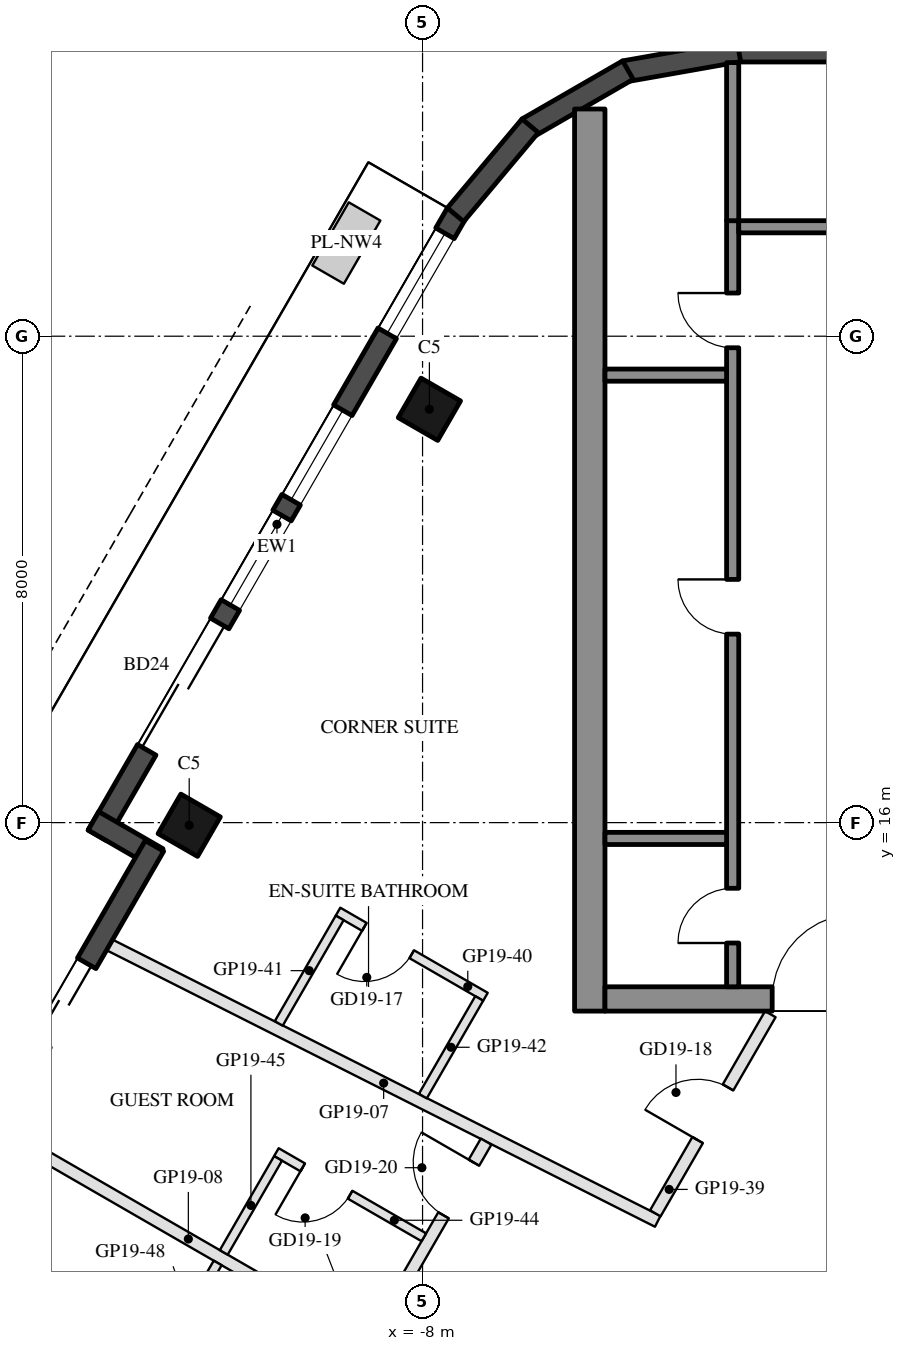
"""IFC4 building model, lengths in metres.
Left out: names, types, materials, properties, quantities, classifications, styles, units other than length and angle.
Written with IfcOpenShell. Run it as: python <this file> out.ifc"""

import sys

from ifc_helpers import new_model, si_unit, direction, frame, frame_2d, origin, origin_2d, place, context, subcontext, project, spatial, rectangle, hollow_rectangle, extrude, element, fill, save


model = new_model("IFC4")
c1 = context("Model", 3, precision=1e-05, world=origin(), true_north=direction((0.0, 1.0)))
c2 = subcontext(c1, "Body", "Model", "MODEL_VIEW")
j1 = project(units=[si_unit("LENGTHUNIT", "METRE"), si_unit("PLANEANGLEUNIT", "RADIAN")], contexts=[c1])
p1 = place(None, origin())
s1 = spatial("IfcSite", under=j1, at=p1, CompositionType="ELEMENT")
p2 = place(p1, origin())
s2 = spatial("IfcBuilding", under=s1, at=p2, CompositionType="ELEMENT")
p3 = place(p2, frame((0.0, 0.0, 205.8)))
s3 = spatial("IfcBuildingStorey", under=s2, at=p3, CompositionType="ELEMENT", Elevation=205.8)
for number, where, z_axis, x_axis in (
    (1, (-7.888, 22.798, 0.0), (0.0, 0.0, 1.0), (0.5, 0.866, 0.0)),
    (2, (-11.838, 15.957, 0.0), (0.0, 0.0, 1.0), (0.5, 0.866, 0.0)),
):
    element("IfcColumn", number, at=place(p3, frame(where, z_axis=z_axis, x_axis=x_axis)), inside=s3, PredefinedType="COLUMN", context=c2, shape_type="SweptSolid", body=[
        extrude(hollow_rectangle(XDim=0.75, YDim=0.75, WallThickness=0.035, at=origin_2d()), origin(), (0.0, 0.0, 1.0), 3.7),
    ])
p4 = place(p3, frame((-7.441, 26.022, 0.0), z_axis=(0.0, 0.0, 1.0), x_axis=(-0.499992533062, -0.86602971478, 0.0)))
e3 = element("IfcWall", 3, at=p4, inside=s3, PredefinedType="SOLIDWALL", context=c2, shape_type="SweptSolid", body=[
    extrude(rectangle(XDim=11.816, YDim=0.35, at=frame_2d((5.908, 0.0))), origin(), (0.0, 0.0, 1.0), 3.55),
])
p5 = place(p4, frame((0.381, 0.0, 0.3)))
e4 = element("IfcOpeningElement", 4, at=p5, cuts=e3, PredefinedType="OPENING", context=c2, shape_type="SweptSolid", body=[
    extrude(rectangle(XDim=1.9, YDim=2.65, at=frame_2d((0.95, 1.325))), frame((0.0, 0.185, 0.0), z_axis=(0.0, -1.0, 0.0), x_axis=(1.0, 0.0, 0.0)), (0.0, 0.0, 1.0), 0.37),
])
p6 = place(p4, frame((7.791, 0.0, 0.0)))
e5 = element("IfcOpeningElement", 5, at=p6, cuts=e3, PredefinedType="OPENING", context=c2, shape_type="SweptSolid", body=[
    extrude(rectangle(XDim=2.4, YDim=2.4, at=frame_2d((1.2, 1.2))), frame((0.0, 0.185, 0.0), z_axis=(0.0, -1.0, 0.0), x_axis=(1.0, 0.0, 0.0)), (0.0, 0.0, 1.0), 0.37),
])
p7 = place(p4, frame((3.741, 0.0, 0.3)))
e6 = element("IfcOpeningElement", 6, at=p7, cuts=e3, PredefinedType="OPENING", context=c2, shape_type="SweptSolid", body=[
    extrude(rectangle(XDim=1.7, YDim=2.65, at=frame_2d((0.85, 1.325))), frame((0.0, 0.185, 0.0), z_axis=(0.0, -1.0, 0.0), x_axis=(1.0, 0.0, 0.0)), (0.0, 0.0, 1.0), 0.37),
])
p8 = place(p4, frame((5.741, 0.0, 0.3)))
e7 = element("IfcOpeningElement", 7, at=p8, cuts=e3, PredefinedType="OPENING", context=c2, shape_type="SweptSolid", body=[
    extrude(rectangle(XDim=1.7, YDim=2.65, at=frame_2d((0.85, 1.325))), frame((0.0, 0.185, 0.0), z_axis=(0.0, -1.0, 0.0), x_axis=(1.0, 0.0, 0.0)), (0.0, 0.0, 1.0), 0.37),
])
p9 = place(p3, frame((-13.413, 16.029, 0.0), z_axis=(0.0, 0.0, 1.0), x_axis=(0.866005645448, -0.500034220881, 0.0)))
e8 = element("IfcWall", 8, at=p9, inside=s3, PredefinedType="SOLIDWALL", context=c2, shape_type="SweptSolid", body=[
    extrude(rectangle(XDim=1.22, YDim=0.35, at=frame_2d((0.61, 0.0))), origin(), (0.0, 0.0, 1.0), 3.55),
])
p10 = place(p3, frame((-12.409, 15.617, 0.0), z_axis=(0.0, 0.0, 1.0), x_axis=(-0.500003597184, -0.866023326939, 0.0)))
e9 = element("IfcWall", 9, at=p10, inside=s3, PredefinedType="SOLIDWALL", context=c2, shape_type="SweptSolid", body=[
    extrude(rectangle(XDim=6.74, YDim=0.35, at=frame_2d((3.37, 0.0))), origin(), (0.0, 0.0, 1.0), 3.55),
])
p11 = place(p10, frame((2.229, 0.0, 0.0)))
e10 = element("IfcOpeningElement", 10, at=p11, cuts=e9, PredefinedType="OPENING", context=c2, shape_type="SweptSolid", body=[
    extrude(rectangle(XDim=1.5, YDim=2.4, at=frame_2d((0.75, 1.2))), frame((0.0, 0.185, 0.0), z_axis=(0.0, -1.0, 0.0), x_axis=(1.0, 0.0, 0.0)), (0.0, 0.0, 1.0), 0.37),
])
p12 = place(p10, frame((4.029, 0.0, 0.3)))
e11 = element("IfcOpeningElement", 11, at=p12, cuts=e9, PredefinedType="OPENING", context=c2, shape_type="SweptSolid", body=[
    extrude(rectangle(XDim=0.8, YDim=2.65, at=frame_2d((0.4, 1.325))), frame((0.0, 0.185, 0.0), z_axis=(0.0, -1.0, 0.0), x_axis=(1.0, 0.0, 0.0)), (0.0, 0.0, 1.0), 0.37),
])
p13 = place(p3, frame((2.829, 28.685, 0.0), z_axis=(0.0, 0.0, 1.0), x_axis=(-1.0, 0.0, 0.0)))
e12 = element("IfcWall", 12, at=p13, inside=s3, PredefinedType="SOLIDWALL", context=c2, shape_type="SweptSolid", body=[
    extrude(rectangle(XDim=5.658, YDim=0.35, at=frame_2d((2.829, 0.0))), origin(), (0.0, 0.0, 1.0), 3.55),
])
for number, where, z_axis, x_axis in (
    (13, (-2.799, 28.688, 0.0), (0.0, 0.0, 1.0), (-0.985, -0.174, 0.0)),
    (14, (-4.623, 28.377, 0.0), (0.0, 0.0, 1.0), (-0.866, -0.5, 0.0)),
):
    element("IfcWall", number, at=place(p3, frame(where, z_axis=z_axis, x_axis=x_axis)), inside=s3, PredefinedType="SOLIDWALL", context=c2, shape_type="SweptSolid", body=[
        extrude(rectangle(XDim=1.91, YDim=0.35, at=frame_2d((0.955, 0.0))), origin(), (0.0, 0.0, 1.0), 3.55),
    ])
p14 = place(p3, frame((-6.23, 27.461, 0.0), z_axis=(0.0, 0.0, 1.0), x_axis=(-0.642808304945, -0.766027077259, 0.0)))
e15 = element("IfcWall", 15, at=p14, inside=s3, PredefinedType="SOLIDWALL", context=c2, shape_type="SweptSolid", body=[
    extrude(rectangle(XDim=1.91, YDim=0.35, at=frame_2d((0.955, 0.0))), origin(), (0.0, 0.0, 1.0), 3.55),
])
p15 = place(p3, frame((-5.25, 12.9, 0.0), z_axis=(0.0, 0.0, 1.0), x_axis=(0.0, 1.0, 0.0)))
e16 = element("IfcWall", 16, at=p15, inside=s3, PredefinedType="SHEAR", context=c2, shape_type="SweptSolid", body=[
    extrude(rectangle(XDim=14.837, YDim=0.5, at=frame_2d((7.418, 0.0))), origin(), (0.0, 0.0, 1.0), 3.5),
])
p16 = place(p3, frame((5.0, 13.1, 0.0), z_axis=(0.0, 0.0, 1.0), x_axis=(-1.0, 0.0, 0.0)))
e17 = element("IfcWall", 17, at=p16, inside=s3, PredefinedType="SHEAR", context=c2, shape_type="SweptSolid", body=[
    extrude(rectangle(XDim=10.0, YDim=0.4, at=frame_2d((5.0, 0.0))), origin(), (0.0, 0.0, 1.0), 3.5),
])
p17 = place(p16, frame((3.55, 0.0, 0.0)))
e18 = element("IfcOpeningElement", 18, at=p17, cuts=e17, PredefinedType="OPENING", context=c2, shape_type="SweptSolid", body=[
    extrude(rectangle(XDim=1.1, YDim=2.1, at=frame_2d((0.55, 1.05))), frame((0.0, 0.21, 0.0), z_axis=(0.0, -1.0, 0.0), x_axis=(1.0, 0.0, 0.0)), (0.0, 0.0, 1.0), 0.42),
])
p18 = place(p16, frame((5.85, 0.0, 0.0)))
e19 = element("IfcOpeningElement", 19, at=p18, cuts=e17, PredefinedType="OPENING", context=c2, shape_type="SweptSolid", body=[
    extrude(rectangle(XDim=1.4, YDim=2.1, at=frame_2d((0.7, 1.05))), frame((0.0, 0.21, 0.0), z_axis=(0.0, -1.0, 0.0), x_axis=(1.0, 0.0, 0.0)), (0.0, 0.0, 1.0), 0.42),
])
p19 = place(p3, frame((-2.9, 13.3, 0.0), z_axis=(0.0, 0.0, 1.0), x_axis=(0.0, 1.0, 0.0)))
e20 = element("IfcWall", 20, at=p19, inside=s3, PredefinedType="SHEAR", context=c2, shape_type="SweptSolid", body=[
    extrude(rectangle(XDim=12.6, YDim=0.2, at=frame_2d((6.3, 0.0))), origin(), (0.0, 0.0, 1.0), 3.5),
])
p20 = place(p19, frame((0.72, 0.0, 0.0)))
e21 = element("IfcOpeningElement", 21, at=p20, cuts=e20, PredefinedType="OPENING", context=c2, shape_type="SweptSolid", body=[
    extrude(rectangle(XDim=0.9, YDim=2.1, at=frame_2d((0.45, 1.05))), frame((0.0, 0.11, 0.0), z_axis=(0.0, -1.0, 0.0), x_axis=(1.0, 0.0, 0.0)), (0.0, 0.0, 1.0), 0.22),
])
p21 = place(p19, frame((5.8, 0.0, 0.0)))
e22 = element("IfcOpeningElement", 22, at=p21, cuts=e20, PredefinedType="OPENING", context=c2, shape_type="SweptSolid", body=[
    extrude(rectangle(XDim=0.9, YDim=2.1, at=frame_2d((0.45, 1.05))), frame((0.0, 0.11, 0.0), z_axis=(0.0, -1.0, 0.0), x_axis=(1.0, 0.0, 0.0)), (0.0, 0.0, 1.0), 0.22),
])
p22 = place(p19, frame((10.51, 0.0, 0.0)))
e23 = element("IfcOpeningElement", 23, at=p22, cuts=e20, PredefinedType="OPENING", context=c2, shape_type="SweptSolid", body=[
    extrude(rectangle(XDim=0.9, YDim=2.1, at=frame_2d((0.45, 1.05))), frame((0.0, 0.11, 0.0), z_axis=(0.0, -1.0, 0.0), x_axis=(1.0, 0.0, 0.0)), (0.0, 0.0, 1.0), 0.22),
])
p23 = place(p3, frame((-0.4, 25.8, 0.0), z_axis=(0.0, 0.0, 1.0), x_axis=(-1.0, 0.0, 0.0)))
e24 = element("IfcWall", 24, at=p23, inside=s3, PredefinedType="SHEAR", context=c2, shape_type="SweptSolid", body=[
    extrude(rectangle(XDim=2.4, YDim=0.2, at=frame_2d((1.2, 0.0))), origin(), (0.0, 0.0, 1.0), 3.5),
])
for number, where, z_axis, x_axis in (
    (25, (-3.0, 15.74, 0.0), (0.0, 0.0, 1.0), (-1.0, 0.0, 0.0)),
    (26, (-3.0, 23.36, 0.0), (0.0, 0.0, 1.0), (-1.0, 0.0, 0.0)),
):
    element("IfcWall", number, at=place(p3, frame(where, z_axis=z_axis, x_axis=x_axis)), inside=s3, PredefinedType="SHEAR", context=c2, shape_type="SweptSolid", body=[
        extrude(rectangle(XDim=2.0, YDim=0.2, at=frame_2d((1.0, 0.0))), origin(), (0.0, 0.0, 1.0), 3.5),
    ])
p24 = place(p3, frame((-2.9, 25.9, 0.0), z_axis=(0.0, 0.0, 1.0), x_axis=(0.0, 1.0, 0.0)))
e27 = element("IfcWall", 27, at=p24, inside=s3, PredefinedType="SHEAR", context=c2, shape_type="SweptSolid", body=[
    extrude(rectangle(XDim=2.6, YDim=0.2, at=frame_2d((1.3, 0.0))), origin(), (0.0, 0.0, 1.0), 3.5),
])
p25 = place(p3, frame((-13.147, 13.989, 0.0), z_axis=(0.0, 0.0, 1.0), x_axis=(0.892898572595, -0.450257858408, 0.0)))
e28 = element("IfcWall", 28, at=p25, inside=s3, PredefinedType="PARTITIONING", context=c2, shape_type="SweptSolid", body=[
    extrude(rectangle(XDim=10.096, YDim=0.2, at=frame_2d((5.048, 0.0))), origin(), (0.0, 0.0, 1.0), 3.06),
])
p26 = place(p3, frame((-14.917, 10.922, 0.0), z_axis=(0.0, 0.0, 1.0), x_axis=(0.866019052629, -0.500011000363, 0.0)))
e29 = element("IfcWall", 29, at=p26, inside=s3, PredefinedType="PARTITIONING", context=c2, shape_type="SweptSolid", body=[
    extrude(rectangle(XDim=7.08, YDim=0.2, at=frame_2d((3.54, 0.0))), origin(), (0.0, 0.0, 1.0), 3.06),
])
p27 = place(p3, frame((-4.172, 9.574, 0.0), z_axis=(0.0, 0.0, 1.0), x_axis=(0.499985062256, 0.866034027923, 0.0)))
e30 = element("IfcWall", 30, at=p27, inside=s3, PredefinedType="PARTITIONING", context=c2, shape_type="SweptSolid", body=[
    extrude(rectangle(XDim=3.782, YDim=0.2, at=frame_2d((1.891, 0.0))), origin(), (0.0, 0.0, 1.0), 2.95),
])
p28 = place(p27, frame((1.391, 0.0, 0.0)))
e31 = element("IfcOpeningElement", 31, at=p28, cuts=e30, PredefinedType="OPENING", context=c2, shape_type="SweptSolid", body=[
    extrude(rectangle(XDim=1.0, YDim=2.1, at=frame_2d((0.5, 1.05))), frame((0.0, 0.11, 0.0), z_axis=(0.0, -1.0, 0.0), x_axis=(1.0, 0.0, 0.0)), (0.0, 0.0, 1.0), 0.22),
])
p29 = place(p3, frame((-6.965, 13.136, 0.0), z_axis=(0.0, 0.0, 1.0), x_axis=(-0.866034573852, 0.49998411664, 0.0)))
e32 = element("IfcWall", 32, at=p29, inside=s3, PredefinedType="PARTITIONING", context=c2, shape_type="SweptSolid", body=[
    extrude(rectangle(XDim=2.8, YDim=0.15, at=frame_2d((1.4, 0.0))), origin(), (0.0, 0.0, 1.0), 2.95),
])
p30 = place(p29, frame((1.4, 0.0, 0.0)))
e33 = element("IfcOpeningElement", 33, at=p30, cuts=e32, PredefinedType="OPENING", context=c2, shape_type="SweptSolid", body=[
    extrude(rectangle(XDim=0.9, YDim=2.1, at=frame_2d((0.45, 1.05))), frame((0.0, 0.085, 0.0), z_axis=(0.0, -1.0, 0.0), x_axis=(1.0, 0.0, 0.0)), (0.0, 0.0, 1.0), 0.17),
])
p31 = place(p3, frame((-9.363, 14.433, 0.0), z_axis=(0.0, 0.0, 1.0), x_axis=(-0.500056363668, -0.86599285976, 0.0)))
e34 = element("IfcWall", 34, at=p31, inside=s3, PredefinedType="PARTITIONING", context=c2, shape_type="SweptSolid", body=[
    extrude(rectangle(XDim=2.004, YDim=0.15, at=frame_2d((1.002, 0.0))), origin(), (0.0, 0.0, 1.0), 2.95),
])
p32 = place(p3, frame((-7.068, 13.108, 0.0), z_axis=(0.0, 0.0, 1.0), x_axis=(-0.4999770169, -0.866038672677, 0.0)))
e35 = element("IfcWall", 35, at=p32, inside=s3, PredefinedType="PARTITIONING", context=c2, shape_type="SweptSolid", body=[
    extrude(rectangle(XDim=1.854, YDim=0.15, at=frame_2d((0.927, 0.0))), origin(), (0.0, 0.0, 1.0), 2.95),
])
p33 = place(p3, frame((-8.823, 7.519, 0.0), z_axis=(0.0, 0.0, 1.0), x_axis=(0.500026055714, 0.866010359988, 0.0)))
e36 = element("IfcWall", 36, at=p33, inside=s3, PredefinedType="PARTITIONING", context=c2, shape_type="SweptSolid", body=[
    extrude(rectangle(XDim=3.736, YDim=0.2, at=frame_2d((1.868, 0.0))), origin(), (0.0, 0.0, 1.0), 2.95),
])
p34 = place(p33, frame((2.336, 0.0, 0.0)))
e37 = element("IfcOpeningElement", 37, at=p34, cuts=e36, PredefinedType="OPENING", context=c2, shape_type="SweptSolid", body=[
    extrude(rectangle(XDim=1.0, YDim=2.1, at=frame_2d((0.5, 1.05))), frame((0.0, 0.11, 0.0), z_axis=(0.0, -1.0, 0.0), x_axis=(1.0, 0.0, 0.0)), (0.0, 0.0, 1.0), 0.22),
])
p35 = place(p3, frame((-7.979, 9.18, 0.0), z_axis=(0.0, 0.0, 1.0), x_axis=(-0.866034573852, 0.49998411664, 0.0)))
e38 = element("IfcWall", 38, at=p35, inside=s3, PredefinedType="PARTITIONING", context=c2, shape_type="SweptSolid", body=[
    extrude(rectangle(XDim=2.8, YDim=0.15, at=frame_2d((1.4, 0.0))), origin(), (0.0, 0.0, 1.0), 2.95),
])
p36 = place(p35, frame((1.4, 0.0, 0.0)))
e39 = element("IfcOpeningElement", 39, at=p36, cuts=e38, PredefinedType="OPENING", context=c2, shape_type="SweptSolid", body=[
    extrude(rectangle(XDim=0.9, YDim=2.1, at=frame_2d((0.45, 1.05))), frame((0.0, 0.085, 0.0), z_axis=(0.0, -1.0, 0.0), x_axis=(1.0, 0.0, 0.0)), (0.0, 0.0, 1.0), 0.17),
])
p37 = place(p3, frame((-10.376, 10.478, 0.0), z_axis=(0.0, 0.0, 1.0), x_axis=(-0.500109033781, -0.865962443949, 0.0)))
e40 = element("IfcWall", 40, at=p37, inside=s3, PredefinedType="PARTITIONING", context=c2, shape_type="SweptSolid", body=[
    extrude(rectangle(XDim=1.786, YDim=0.15, at=frame_2d((0.893, 0.0))), origin(), (0.0, 0.0, 1.0), 2.95),
])
p38 = place(p3, frame((-11.369, 8.758, 0.0), z_axis=(0.0, 0.0, 1.0), x_axis=(-0.500042316284, -0.866000971088, 0.0)))
e41 = element("IfcWall", 41, at=p38, inside=s3, PredefinedType="PARTITIONING", context=c2, shape_type="SweptSolid", body=[
    extrude(rectangle(XDim=1.85, YDim=0.15, at=frame_2d((0.925, 0.0))), origin(), (0.0, 0.0, 1.0), 2.95),
])
p39 = place(p5, origin())
e42 = element("IfcWindow", 42, at=p39, inside=s3, PartitioningType="SINGLE_PANEL", PredefinedType="WINDOW", context=c2, shape_type="SweptSolid", body=[
    extrude(rectangle(XDim=1.9, YDim=2.65, at=frame_2d((0.95, 1.325))), frame((0.0, 0.03, 0.0), z_axis=(0.0, -1.0, 0.0), x_axis=(1.0, 0.0, 0.0)), (0.0, 0.0, 1.0), 0.06),
])
fill(e4, e42)
p40 = place(p6, frame((2.4, 0.0, 0.0), z_axis=(0.0, 0.0, 1.0), x_axis=(-1.0, 0.0, 0.0)))
e43 = element("IfcDoor", 43, at=p40, inside=s3, OperationType="SLIDING_TO_LEFT", PredefinedType="DOOR", context=c2, shape_type="SweptSolid", body=[
    extrude(rectangle(XDim=2.4, YDim=2.4, at=frame_2d((1.2, 1.2))), frame((0.0, 0.025, 0.0), z_axis=(0.0, -1.0, 0.0), x_axis=(1.0, 0.0, 0.0)), (0.0, 0.0, 1.0), 0.05),
])
fill(e5, e43)
p41 = place(p7, origin())
e44 = element("IfcWindow", 44, at=p41, inside=s3, PartitioningType="SINGLE_PANEL", PredefinedType="WINDOW", context=c2, shape_type="SweptSolid", body=[
    extrude(rectangle(XDim=1.7, YDim=2.65, at=frame_2d((0.85, 1.325))), frame((0.0, 0.03, 0.0), z_axis=(0.0, -1.0, 0.0), x_axis=(1.0, 0.0, 0.0)), (0.0, 0.0, 1.0), 0.06),
])
fill(e6, e44)
p42 = place(p8, origin())
e45 = element("IfcWindow", 45, at=p42, inside=s3, PartitioningType="SINGLE_PANEL", PredefinedType="WINDOW", context=c2, shape_type="SweptSolid", body=[
    extrude(rectangle(XDim=1.7, YDim=2.65, at=frame_2d((0.85, 1.325))), frame((0.0, 0.03, 0.0), z_axis=(0.0, -1.0, 0.0), x_axis=(1.0, 0.0, 0.0)), (0.0, 0.0, 1.0), 0.06),
])
fill(e7, e45)
p43 = place(p11, frame((1.5, 0.0, 0.0), z_axis=(0.0, 0.0, 1.0), x_axis=(-1.0, 0.0, 0.0)))
e46 = element("IfcDoor", 46, at=p43, inside=s3, OperationType="SLIDING_TO_LEFT", PredefinedType="DOOR", context=c2, shape_type="SweptSolid", body=[
    extrude(rectangle(XDim=1.5, YDim=2.4, at=frame_2d((0.75, 1.2))), frame((0.0, 0.025, 0.0), z_axis=(0.0, -1.0, 0.0), x_axis=(1.0, 0.0, 0.0)), (0.0, 0.0, 1.0), 0.05),
])
fill(e10, e46)
p44 = place(p20, origin())
e47 = element("IfcDoor", 47, at=p44, inside=s3, OperationType="SINGLE_SWING_LEFT", PredefinedType="DOOR", context=c2, shape_type="SweptSolid", body=[
    extrude(rectangle(XDim=0.9, YDim=2.1, at=frame_2d((0.45, 1.05))), frame((0.0, 0.025, 0.0), z_axis=(0.0, -1.0, 0.0), x_axis=(1.0, 0.0, 0.0)), (0.0, 0.0, 1.0), 0.05),
])
fill(e21, e47)
p45 = place(p21, origin())
e48 = element("IfcDoor", 48, at=p45, inside=s3, OperationType="SINGLE_SWING_RIGHT", PredefinedType="DOOR", context=c2, shape_type="SweptSolid", body=[
    extrude(rectangle(XDim=0.9, YDim=2.1, at=frame_2d((0.45, 1.05))), frame((0.0, 0.025, 0.0), z_axis=(0.0, -1.0, 0.0), x_axis=(1.0, 0.0, 0.0)), (0.0, 0.0, 1.0), 0.05),
])
fill(e22, e48)
p46 = place(p22, origin())
e49 = element("IfcDoor", 49, at=p46, inside=s3, OperationType="SINGLE_SWING_RIGHT", PredefinedType="DOOR", context=c2, shape_type="SweptSolid", body=[
    extrude(rectangle(XDim=0.9, YDim=2.1, at=frame_2d((0.45, 1.05))), frame((0.0, 0.025, 0.0), z_axis=(0.0, -1.0, 0.0), x_axis=(1.0, 0.0, 0.0)), (0.0, 0.0, 1.0), 0.05),
])
fill(e23, e49)
p47 = place(p18, frame((1.4, 0.0, 0.0), z_axis=(0.0, 0.0, 1.0), x_axis=(-1.0, 0.0, 0.0)))
e50 = element("IfcDoor", 50, at=p47, inside=s3, OperationType="DOUBLE_DOOR_SINGLE_SWING", PredefinedType="DOOR", context=c2, shape_type="SweptSolid", body=[
    extrude(rectangle(XDim=1.4, YDim=2.1, at=frame_2d((0.7, 1.05))), frame((0.0, 0.025, 0.0), z_axis=(0.0, -1.0, 0.0), x_axis=(1.0, 0.0, 0.0)), (0.0, 0.0, 1.0), 0.05),
])
fill(e19, e50)
p48 = place(p30, origin())
e51 = element("IfcDoor", 51, at=p48, inside=s3, OperationType="SINGLE_SWING_RIGHT", PredefinedType="DOOR", context=c2, shape_type="SweptSolid", body=[
    extrude(rectangle(XDim=0.9, YDim=2.1, at=frame_2d((0.45, 1.05))), frame((0.0, 0.025, 0.0), z_axis=(0.0, -1.0, 0.0), x_axis=(1.0, 0.0, 0.0)), (0.0, 0.0, 1.0), 0.05),
])
fill(e33, e51)
p49 = place(p28, origin())
e52 = element("IfcDoor", 52, at=p49, inside=s3, OperationType="SINGLE_SWING_LEFT", PredefinedType="DOOR", context=c2, shape_type="SweptSolid", body=[
    extrude(rectangle(XDim=1.0, YDim=2.1, at=frame_2d((0.5, 1.05))), frame((0.0, 0.025, 0.0), z_axis=(0.0, -1.0, 0.0), x_axis=(1.0, 0.0, 0.0)), (0.0, 0.0, 1.0), 0.05),
])
fill(e31, e52)
p50 = place(p36, origin())
e53 = element("IfcDoor", 53, at=p50, inside=s3, OperationType="SINGLE_SWING_RIGHT", PredefinedType="DOOR", context=c2, shape_type="SweptSolid", body=[
    extrude(rectangle(XDim=0.9, YDim=2.1, at=frame_2d((0.45, 1.05))), frame((0.0, 0.025, 0.0), z_axis=(0.0, -1.0, 0.0), x_axis=(1.0, 0.0, 0.0)), (0.0, 0.0, 1.0), 0.05),
])
fill(e39, e53)
p51 = place(p34, origin())
e54 = element("IfcDoor", 54, at=p51, inside=s3, OperationType="SINGLE_SWING_RIGHT", PredefinedType="DOOR", context=c2, shape_type="SweptSolid", body=[
    extrude(rectangle(XDim=1.0, YDim=2.1, at=frame_2d((0.5, 1.05))), frame((0.0, 0.025, 0.0), z_axis=(0.0, -1.0, 0.0), x_axis=(1.0, 0.0, 0.0)), (0.0, 0.0, 1.0), 0.05),
])
fill(e37, e54)
save(model, sys.argv[1])
